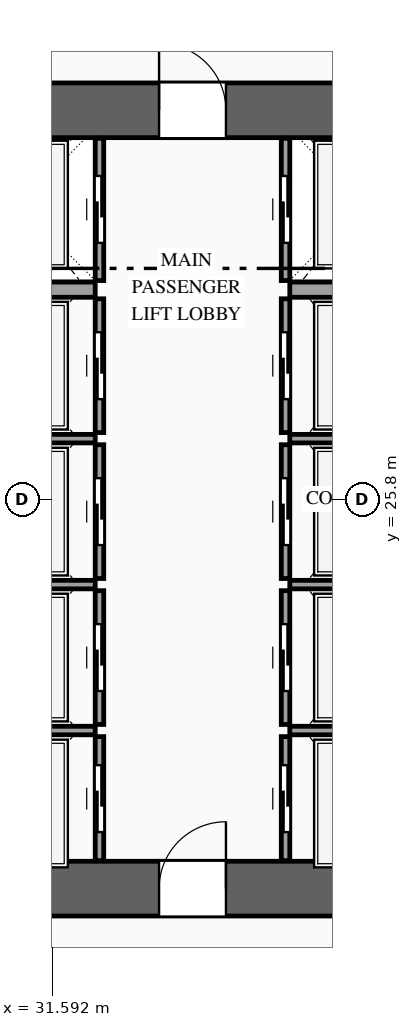
"""IFC4 building model, lengths in metres.
Left out: names, types, materials, properties, quantities, classifications, styles, units other than length and angle.
Written with IfcOpenShell. Run it as: python <this file> out.ifc"""

import sys

from ifc_helpers import new_model, si_unit, direction, frame, frame_2d, origin, place, context, subcontext, project, spatial, rectangle, extrude, source, transform, mapped, element, fill, save


model = new_model("IFC4")
c1 = context("Model", 3, precision=1e-05, world=origin(), true_north=direction((0.0, 1.0)))
c2 = subcontext(c1, "Body", "Model", "MODEL_VIEW")
j1 = project(units=[si_unit("LENGTHUNIT", "METRE"), si_unit("PLANEANGLEUNIT", "RADIAN")], contexts=[c1])
p1 = place(None, origin())
s1 = spatial("IfcSite", under=j1, at=p1, CompositionType="ELEMENT")
p2 = place(p1, origin())
s2 = spatial("IfcBuilding", under=s1, at=p2, CompositionType="ELEMENT")
p3 = place(p2, origin())
s3 = spatial("IfcBuildingStorey", under=s2, at=p3, CompositionType="ELEMENT", Elevation=0.0)
p4 = place(p3, frame((23.35, 19.4, 0.0), z_axis=(0.0, 0.0, 1.0), x_axis=(1.0, 0.0, 0.0)))
e1 = element("IfcWall", 1, at=p4, inside=s3, PredefinedType="SHEAR", context=c2, shape_type="SweptSolid", body=[
    extrude(rectangle(XDim=27.3, YDim=0.9, at=frame_2d((13.65, 0.0))), origin(), (0.0, 0.0, 1.0), 5.4),
])
p5 = place(p4, frame((2.1, 0.0, 0.0)))
e2 = element("IfcOpeningElement", 2, at=p5, cuts=e1, PredefinedType="OPENING", context=c2, shape_type="SweptSolid", body=[
    extrude(rectangle(XDim=1.1, YDim=2.2, at=frame_2d((0.55, 1.1))), frame((0.0, 0.465, 0.0), z_axis=(0.0, -1.0, 0.0), x_axis=(1.0, 0.0, 0.0)), (0.0, 0.0, 1.0), 0.93),
])
p6 = place(p4, frame((10.0, 0.0, 0.0)))
e3 = element("IfcOpeningElement", 3, at=p6, cuts=e1, PredefinedType="OPENING", context=c2, shape_type="SweptSolid", body=[
    extrude(rectangle(XDim=1.1, YDim=2.2, at=frame_2d((0.55, 1.1))), frame((0.0, 0.465, 0.0), z_axis=(0.0, -1.0, 0.0), x_axis=(1.0, 0.0, 0.0)), (0.0, 0.0, 1.0), 0.93),
])
p7 = place(p4, frame((23.2, 0.0, 0.0)))
e4 = element("IfcOpeningElement", 4, at=p7, cuts=e1, PredefinedType="OPENING", context=c2, shape_type="SweptSolid", body=[
    extrude(rectangle(XDim=1.1, YDim=2.2, at=frame_2d((0.55, 1.1))), frame((0.0, 0.465, 0.0), z_axis=(0.0, -1.0, 0.0), x_axis=(1.0, 0.0, 0.0)), (0.0, 0.0, 1.0), 0.93),
])
p8 = place(p4, frame((19.82, 0.0, 0.0)))
e5 = element("IfcOpeningElement", 5, at=p8, cuts=e1, PredefinedType="OPENING", context=c2, shape_type="SweptSolid", body=[
    extrude(rectangle(XDim=0.9, YDim=2.15, at=frame_2d((0.45, 1.075))), frame((0.0, 0.465, 0.0), z_axis=(0.0, -1.0, 0.0), x_axis=(1.0, 0.0, 0.0)), (0.0, 0.0, 1.0), 0.93),
])
p9 = place(p4, frame((18.38, 0.0, 0.0)))
e6 = element("IfcOpeningElement", 6, at=p9, cuts=e1, PredefinedType="OPENING", context=c2, shape_type="SweptSolid", body=[
    extrude(rectangle(XDim=0.9, YDim=2.15, at=frame_2d((0.45, 1.075))), frame((0.0, 0.465, 0.0), z_axis=(0.0, -1.0, 0.0), x_axis=(1.0, 0.0, 0.0)), (0.0, 0.0, 1.0), 0.93),
])
p10 = place(p3, frame((23.35, 32.2, 0.0), z_axis=(0.0, 0.0, 1.0), x_axis=(1.0, 0.0, 0.0)))
e7 = element("IfcWall", 7, at=p10, inside=s3, PredefinedType="SHEAR", context=c2, shape_type="SweptSolid", body=[
    extrude(rectangle(XDim=27.3, YDim=0.9, at=frame_2d((13.65, 0.0))), origin(), (0.0, 0.0, 1.0), 5.4),
])
p11 = place(p10, frame((4.72, 0.0, 0.0)))
e8 = element("IfcOpeningElement", 8, at=p11, cuts=e7, PredefinedType="OPENING", context=c2, shape_type="SweptSolid", body=[
    extrude(rectangle(XDim=0.9, YDim=2.15, at=frame_2d((0.45, 1.075))), frame((0.0, 0.465, 0.0), z_axis=(0.0, -1.0, 0.0), x_axis=(1.0, 0.0, 0.0)), (0.0, 0.0, 1.0), 0.93),
])
p12 = place(p10, frame((10.0, 0.0, 0.0)))
e9 = element("IfcOpeningElement", 9, at=p12, cuts=e7, PredefinedType="OPENING", context=c2, shape_type="SweptSolid", body=[
    extrude(rectangle(XDim=1.1, YDim=2.2, at=frame_2d((0.55, 1.1))), frame((0.0, 0.465, 0.0), z_axis=(0.0, -1.0, 0.0), x_axis=(1.0, 0.0, 0.0)), (0.0, 0.0, 1.0), 0.93),
])
p13 = place(p10, frame((15.85, 0.0, 0.0)))
e10 = element("IfcOpeningElement", 10, at=p13, cuts=e7, PredefinedType="OPENING", context=c2, shape_type="SweptSolid", body=[
    extrude(rectangle(XDim=1.1, YDim=2.2, at=frame_2d((0.55, 1.1))), frame((0.0, 0.465, 0.0), z_axis=(0.0, -1.0, 0.0), x_axis=(1.0, 0.0, 0.0)), (0.0, 0.0, 1.0), 0.93),
])
p14 = place(p10, frame((18.95, 0.0, 0.0)))
e11 = element("IfcOpeningElement", 11, at=p14, cuts=e7, PredefinedType="OPENING", context=c2, shape_type="SweptSolid", body=[
    extrude(rectangle(XDim=1.1, YDim=2.2, at=frame_2d((0.55, 1.1))), frame((0.0, 0.465, 0.0), z_axis=(0.0, -1.0, 0.0), x_axis=(1.0, 0.0, 0.0)), (0.0, 0.0, 1.0), 0.93),
])
p15 = place(p3, frame((32.37, 19.86, 0.0), z_axis=(0.0, 0.0, 1.0), x_axis=(0.0, 1.0, 0.0)))
e12 = element("IfcWall", 12, at=p15, inside=s3, PredefinedType="SOLIDWALL", context=c2, shape_type="SweptSolid", body=[
    extrude(rectangle(XDim=2.04, YDim=0.14, at=frame_2d((1.02, 0.0))), origin(), (0.0, 0.0, 1.0), 5.12),
])
p16 = place(p15, frame((0.47, 0.0, 0.0)))
e13 = element("IfcOpeningElement", 13, at=p16, cuts=e12, PredefinedType="OPENING", context=c2, shape_type="SweptSolid", body=[
    extrude(rectangle(XDim=1.1, YDim=2.2, at=frame_2d((0.55, 1.1))), frame((0.0, 0.085, 0.0), z_axis=(0.0, -1.0, 0.0), x_axis=(1.0, 0.0, 0.0)), (0.0, 0.0, 1.0), 0.17),
])
m1 = source(origin(), c2, "Body", "SweptSolid", [
    extrude(rectangle(XDim=2.5, YDim=0.14, at=frame_2d((1.25, 0.0))), origin(), (0.0, 0.0, 1.0), 5.12),
])
p17 = place(p3, frame((29.8, 22.0, 0.0), z_axis=(0.0, 0.0, 1.0), x_axis=(1.0, 0.0, 0.0)))
e14 = element("IfcWall", 14, at=p17, inside=s3, PredefinedType="SOLIDWALL", context=c2, shape_type="MappedRepresentation", body=[
    mapped(m1, transform((0.0, 0.0, 0.0), scale=1.0)),
])
p18 = place(p3, frame((32.37, 22.1, 0.0), z_axis=(0.0, 0.0, 1.0), x_axis=(0.0, 1.0, 0.0)))
e15 = element("IfcWall", 15, at=p18, inside=s3, PredefinedType="SOLIDWALL", context=c2, shape_type="SweptSolid", body=[
    extrude(rectangle(XDim=2.2, YDim=0.14, at=frame_2d((1.1, 0.0))), origin(), (0.0, 0.0, 1.0), 5.12),
])
p19 = place(p18, frame((0.55, 0.0, 0.0)))
e16 = element("IfcOpeningElement", 16, at=p19, cuts=e15, PredefinedType="OPENING", context=c2, shape_type="SweptSolid", body=[
    extrude(rectangle(XDim=1.1, YDim=2.2, at=frame_2d((0.55, 1.1))), frame((0.0, 0.085, 0.0), z_axis=(0.0, -1.0, 0.0), x_axis=(1.0, 0.0, 0.0)), (0.0, 0.0, 1.0), 0.17),
])
p20 = place(p3, frame((29.8, 24.4, 0.0), z_axis=(0.0, 0.0, 1.0), x_axis=(1.0, 0.0, 0.0)))
e17 = element("IfcWall", 17, at=p20, inside=s3, PredefinedType="SOLIDWALL", context=c2, shape_type="MappedRepresentation", body=[
    mapped(m1, transform((0.0, 0.0, 0.0), scale=1.0)),
])
p21 = place(p3, frame((32.37, 24.5, 0.0), z_axis=(0.0, 0.0, 1.0), x_axis=(0.0, 1.0, 0.0)))
e18 = element("IfcWall", 18, at=p21, inside=s3, PredefinedType="SOLIDWALL", context=c2, shape_type="SweptSolid", body=[
    extrude(rectangle(XDim=2.2, YDim=0.14, at=frame_2d((1.1, 0.0))), origin(), (0.0, 0.0, 1.0), 5.12),
])
p22 = place(p21, frame((0.55, 0.0, 0.0)))
e19 = element("IfcOpeningElement", 19, at=p22, cuts=e18, PredefinedType="OPENING", context=c2, shape_type="SweptSolid", body=[
    extrude(rectangle(XDim=1.1, YDim=2.2, at=frame_2d((0.55, 1.1))), frame((0.0, 0.085, 0.0), z_axis=(0.0, -1.0, 0.0), x_axis=(1.0, 0.0, 0.0)), (0.0, 0.0, 1.0), 0.17),
])
p23 = place(p3, frame((29.8, 26.8, 0.0), z_axis=(0.0, 0.0, 1.0), x_axis=(1.0, 0.0, 0.0)))
e20 = element("IfcWall", 20, at=p23, inside=s3, PredefinedType="SOLIDWALL", context=c2, shape_type="MappedRepresentation", body=[
    mapped(m1, transform((0.0, 0.0, 0.0), scale=1.0)),
])
p24 = place(p3, frame((32.37, 26.9, 0.0), z_axis=(0.0, 0.0, 1.0), x_axis=(0.0, 1.0, 0.0)))
e21 = element("IfcWall", 21, at=p24, inside=s3, PredefinedType="SOLIDWALL", context=c2, shape_type="SweptSolid", body=[
    extrude(rectangle(XDim=2.2, YDim=0.14, at=frame_2d((1.1, 0.0))), origin(), (0.0, 0.0, 1.0), 5.12),
])
p25 = place(p24, frame((0.55, 0.0, 0.0)))
e22 = element("IfcOpeningElement", 22, at=p25, cuts=e21, PredefinedType="OPENING", context=c2, shape_type="SweptSolid", body=[
    extrude(rectangle(XDim=1.1, YDim=2.2, at=frame_2d((0.55, 1.1))), frame((0.0, 0.085, 0.0), z_axis=(0.0, -1.0, 0.0), x_axis=(1.0, 0.0, 0.0)), (0.0, 0.0, 1.0), 0.17),
])
p26 = place(p3, frame((32.37, 29.4, 0.0), z_axis=(0.0, 0.0, 1.0), x_axis=(0.0, 1.0, 0.0)))
e23 = element("IfcWall", 23, at=p26, inside=s3, PredefinedType="SOLIDWALL", context=c2, shape_type="SweptSolid", body=[
    extrude(rectangle(XDim=2.34, YDim=0.14, at=frame_2d((1.17, 0.0))), origin(), (0.0, 0.0, 1.0), 5.12),
])
p27 = place(p26, frame((0.62, 0.0, 0.0)))
e24 = element("IfcOpeningElement", 24, at=p27, cuts=e23, PredefinedType="OPENING", context=c2, shape_type="SweptSolid", body=[
    extrude(rectangle(XDim=1.1, YDim=2.2, at=frame_2d((0.55, 1.1))), frame((0.0, 0.085, 0.0), z_axis=(0.0, -1.0, 0.0), x_axis=(1.0, 0.0, 0.0)), (0.0, 0.0, 1.0), 0.17),
])
m2 = source(origin(), c2, "Body", "SweptSolid", [
    extrude(rectangle(XDim=2.5, YDim=0.25, at=frame_2d((1.25, 0.0))), origin(), (0.0, 0.0, 1.0), 5.12),
])
p28 = place(p3, frame((29.8, 29.25, 0.0), z_axis=(0.0, 0.0, 1.0), x_axis=(1.0, 0.0, 0.0)))
e25 = element("IfcWall", 25, at=p28, inside=s3, PredefinedType="SOLIDWALL", context=c2, shape_type="MappedRepresentation", body=[
    mapped(m2, transform((0.0, 0.0, 0.0), scale=1.0)),
])
p29 = place(p3, frame((35.43, 19.86, 0.0), z_axis=(0.0, 0.0, 1.0), x_axis=(0.0, 1.0, 0.0)))
e26 = element("IfcWall", 26, at=p29, inside=s3, PredefinedType="SOLIDWALL", context=c2, shape_type="SweptSolid", body=[
    extrude(rectangle(XDim=2.04, YDim=0.14, at=frame_2d((1.02, 0.0))), origin(), (0.0, 0.0, 1.0), 5.12),
])
p30 = place(p29, frame((0.47, 0.0, 0.0)))
e27 = element("IfcOpeningElement", 27, at=p30, cuts=e26, PredefinedType="OPENING", context=c2, shape_type="SweptSolid", body=[
    extrude(rectangle(XDim=1.1, YDim=2.2, at=frame_2d((0.55, 1.1))), frame((0.0, 0.085, 0.0), z_axis=(0.0, -1.0, 0.0), x_axis=(1.0, 0.0, 0.0)), (0.0, 0.0, 1.0), 0.17),
])
m3 = source(origin(), c2, "Body", "SweptSolid", [
    extrude(rectangle(XDim=2.4, YDim=0.14, at=frame_2d((1.2, 0.0))), origin(), (0.0, 0.0, 1.0), 5.12),
])
p31 = place(p3, frame((35.5, 22.0, 0.0), z_axis=(0.0, 0.0, 1.0), x_axis=(1.0, 0.0, 0.0)))
e28 = element("IfcWall", 28, at=p31, inside=s3, PredefinedType="SOLIDWALL", context=c2, shape_type="MappedRepresentation", body=[
    mapped(m3, transform((0.0, 0.0, 0.0), scale=1.0)),
])
p32 = place(p3, frame((35.43, 22.1, 0.0), z_axis=(0.0, 0.0, 1.0), x_axis=(0.0, 1.0, 0.0)))
e29 = element("IfcWall", 29, at=p32, inside=s3, PredefinedType="SOLIDWALL", context=c2, shape_type="SweptSolid", body=[
    extrude(rectangle(XDim=2.2, YDim=0.14, at=frame_2d((1.1, 0.0))), origin(), (0.0, 0.0, 1.0), 5.12),
])
p33 = place(p32, frame((0.55, 0.0, 0.0)))
e30 = element("IfcOpeningElement", 30, at=p33, cuts=e29, PredefinedType="OPENING", context=c2, shape_type="SweptSolid", body=[
    extrude(rectangle(XDim=1.1, YDim=2.2, at=frame_2d((0.55, 1.1))), frame((0.0, 0.085, 0.0), z_axis=(0.0, -1.0, 0.0), x_axis=(1.0, 0.0, 0.0)), (0.0, 0.0, 1.0), 0.17),
])
p34 = place(p3, frame((35.5, 24.4, 0.0), z_axis=(0.0, 0.0, 1.0), x_axis=(1.0, 0.0, 0.0)))
e31 = element("IfcWall", 31, at=p34, inside=s3, PredefinedType="SOLIDWALL", context=c2, shape_type="MappedRepresentation", body=[
    mapped(m3, transform((0.0, 0.0, 0.0), scale=1.0)),
])
p35 = place(p3, frame((35.43, 24.5, 0.0), z_axis=(0.0, 0.0, 1.0), x_axis=(0.0, 1.0, 0.0)))
e32 = element("IfcWall", 32, at=p35, inside=s3, PredefinedType="SOLIDWALL", context=c2, shape_type="SweptSolid", body=[
    extrude(rectangle(XDim=2.2, YDim=0.14, at=frame_2d((1.1, 0.0))), origin(), (0.0, 0.0, 1.0), 5.12),
])
p36 = place(p35, frame((0.55, 0.0, 0.0)))
e33 = element("IfcOpeningElement", 33, at=p36, cuts=e32, PredefinedType="OPENING", context=c2, shape_type="SweptSolid", body=[
    extrude(rectangle(XDim=1.1, YDim=2.2, at=frame_2d((0.55, 1.1))), frame((0.0, 0.085, 0.0), z_axis=(0.0, -1.0, 0.0), x_axis=(1.0, 0.0, 0.0)), (0.0, 0.0, 1.0), 0.17),
])
p37 = place(p3, frame((35.5, 26.8, 0.0), z_axis=(0.0, 0.0, 1.0), x_axis=(1.0, 0.0, 0.0)))
e34 = element("IfcWall", 34, at=p37, inside=s3, PredefinedType="SOLIDWALL", context=c2, shape_type="MappedRepresentation", body=[
    mapped(m3, transform((0.0, 0.0, 0.0), scale=1.0)),
])
p38 = place(p3, frame((35.43, 26.9, 0.0), z_axis=(0.0, 0.0, 1.0), x_axis=(0.0, 1.0, 0.0)))
e35 = element("IfcWall", 35, at=p38, inside=s3, PredefinedType="SOLIDWALL", context=c2, shape_type="SweptSolid", body=[
    extrude(rectangle(XDim=2.2, YDim=0.14, at=frame_2d((1.1, 0.0))), origin(), (0.0, 0.0, 1.0), 5.12),
])
p39 = place(p38, frame((0.55, 0.0, 0.0)))
e36 = element("IfcOpeningElement", 36, at=p39, cuts=e35, PredefinedType="OPENING", context=c2, shape_type="SweptSolid", body=[
    extrude(rectangle(XDim=1.1, YDim=2.2, at=frame_2d((0.55, 1.1))), frame((0.0, 0.085, 0.0), z_axis=(0.0, -1.0, 0.0), x_axis=(1.0, 0.0, 0.0)), (0.0, 0.0, 1.0), 0.17),
])
p40 = place(p3, frame((35.43, 29.4, 0.0), z_axis=(0.0, 0.0, 1.0), x_axis=(0.0, 1.0, 0.0)))
e37 = element("IfcWall", 37, at=p40, inside=s3, PredefinedType="SOLIDWALL", context=c2, shape_type="SweptSolid", body=[
    extrude(rectangle(XDim=2.34, YDim=0.14, at=frame_2d((1.17, 0.0))), origin(), (0.0, 0.0, 1.0), 5.12),
])
p41 = place(p40, frame((0.62, 0.0, 0.0)))
e38 = element("IfcOpeningElement", 38, at=p41, cuts=e37, PredefinedType="OPENING", context=c2, shape_type="SweptSolid", body=[
    extrude(rectangle(XDim=1.1, YDim=2.2, at=frame_2d((0.55, 1.1))), frame((0.0, 0.085, 0.0), z_axis=(0.0, -1.0, 0.0), x_axis=(1.0, 0.0, 0.0)), (0.0, 0.0, 1.0), 0.17),
])
m4 = source(origin(), c2, "Body", "SweptSolid", [
    extrude(rectangle(XDim=2.4, YDim=0.25, at=frame_2d((1.2, 0.0))), origin(), (0.0, 0.0, 1.0), 5.12),
])
p42 = place(p3, frame((35.5, 29.25, 0.0), z_axis=(0.0, 0.0, 1.0), x_axis=(1.0, 0.0, 0.0)))
e39 = element("IfcWall", 39, at=p42, inside=s3, PredefinedType="SOLIDWALL", context=c2, shape_type="MappedRepresentation", body=[
    mapped(m4, transform((0.0, 0.0, 0.0), scale=1.0)),
])
m5 = source(origin(), c2, "Body", "SweptSolid", [
    extrude(rectangle(XDim=1.1, YDim=2.2, at=frame_2d((0.55, 1.1))), frame((0.0, 0.025, 0.0), z_axis=(0.0, -1.0, 0.0), x_axis=(1.0, 0.0, 0.0)), (0.0, 0.0, 1.0), 0.05),
])
p43 = place(p16, origin())
e40 = element("IfcDoor", 40, at=p43, inside=s3, OperationType="SLIDING_TO_LEFT", PredefinedType="DOOR", context=c2, shape_type="MappedRepresentation", body=[
    mapped(m5, transform((0.0, 0.0, 0.0), scale=1.0)),
])
fill(e13, e40)
p44 = place(p19, origin())
e41 = element("IfcDoor", 41, at=p44, inside=s3, OperationType="SLIDING_TO_RIGHT", PredefinedType="DOOR", context=c2, shape_type="MappedRepresentation", body=[
    mapped(m5, transform((0.0, 0.0, 0.0), scale=1.0)),
])
fill(e16, e41)
p45 = place(p22, origin())
e42 = element("IfcDoor", 42, at=p45, inside=s3, OperationType="SLIDING_TO_LEFT", PredefinedType="DOOR", context=c2, shape_type="MappedRepresentation", body=[
    mapped(m5, transform((0.0, 0.0, 0.0), scale=1.0)),
])
fill(e19, e42)
p46 = place(p25, origin())
e43 = element("IfcDoor", 43, at=p46, inside=s3, OperationType="SLIDING_TO_RIGHT", PredefinedType="DOOR", context=c2, shape_type="MappedRepresentation", body=[
    mapped(m5, transform((0.0, 0.0, 0.0), scale=1.0)),
])
fill(e22, e43)
p47 = place(p27, origin())
e44 = element("IfcDoor", 44, at=p47, inside=s3, OperationType="SLIDING_TO_LEFT", PredefinedType="DOOR", context=c2, shape_type="MappedRepresentation", body=[
    mapped(m5, transform((0.0, 0.0, 0.0), scale=1.0)),
])
fill(e24, e44)
p48 = place(p30, origin())
e45 = element("IfcDoor", 45, at=p48, inside=s3, OperationType="SLIDING_TO_RIGHT", PredefinedType="DOOR", context=c2, shape_type="MappedRepresentation", body=[
    mapped(m5, transform((0.0, 0.0, 0.0), scale=1.0)),
])
fill(e27, e45)
p49 = place(p33, origin())
e46 = element("IfcDoor", 46, at=p49, inside=s3, OperationType="SLIDING_TO_LEFT", PredefinedType="DOOR", context=c2, shape_type="MappedRepresentation", body=[
    mapped(m5, transform((0.0, 0.0, 0.0), scale=1.0)),
])
fill(e30, e46)
p50 = place(p36, origin())
e47 = element("IfcDoor", 47, at=p50, inside=s3, OperationType="SLIDING_TO_RIGHT", PredefinedType="DOOR", context=c2, shape_type="MappedRepresentation", body=[
    mapped(m5, transform((0.0, 0.0, 0.0), scale=1.0)),
])
fill(e33, e47)
p51 = place(p39, origin())
e48 = element("IfcDoor", 48, at=p51, inside=s3, OperationType="SLIDING_TO_LEFT", PredefinedType="DOOR", context=c2, shape_type="MappedRepresentation", body=[
    mapped(m5, transform((0.0, 0.0, 0.0), scale=1.0)),
])
fill(e36, e48)
p52 = place(p41, origin())
e49 = element("IfcDoor", 49, at=p52, inside=s3, OperationType="SLIDING_TO_RIGHT", PredefinedType="DOOR", context=c2, shape_type="MappedRepresentation", body=[
    mapped(m5, transform((0.0, 0.0, 0.0), scale=1.0)),
])
fill(e38, e49)
m6 = source(origin(), c2, "Body", "SweptSolid", [
    extrude(rectangle(XDim=1.1, YDim=2.2, at=frame_2d((0.55, 1.1))), frame((0.0, 0.025, 0.0), z_axis=(0.0, -1.0, 0.0), x_axis=(1.0, 0.0, 0.0)), (0.0, 0.0, 1.0), 0.05),
])
p53 = place(p6, origin())
e50 = element("IfcDoor", 50, at=p53, inside=s3, OperationType="SINGLE_SWING_RIGHT", PredefinedType="DOOR", context=c2, shape_type="MappedRepresentation", body=[
    mapped(m6, transform((0.0, 0.0, 0.0), scale=1.0)),
])
fill(e3, e50)
p54 = place(p12, origin())
e51 = element("IfcDoor", 51, at=p54, inside=s3, OperationType="SINGLE_SWING_LEFT", PredefinedType="DOOR", context=c2, shape_type="MappedRepresentation", body=[
    mapped(m6, transform((0.0, 0.0, 0.0), scale=1.0)),
])
fill(e9, e51)
save(model, sys.argv[1])
